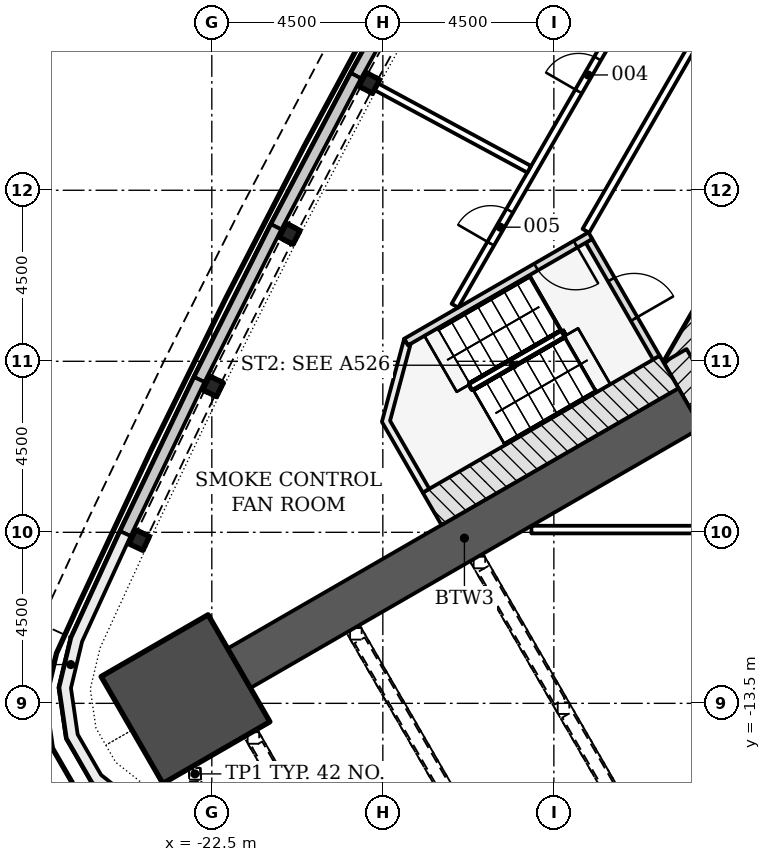
"""IFC4 building model, lengths in metres.
Left out: names, types, materials, properties, quantities, classifications, styles, units other than length and angle.
Written with IfcOpenShell. Run it as: python <this file> out.ifc"""

import sys

from ifc_helpers import new_model, si_unit, direction, frame, frame_2d, origin, origin_2d, place, context, subcontext, project, spatial, polyline, rectangle, i_section, outline, extrude, element, fill, save


model = new_model("IFC4")
c1 = context("Model", 3, precision=1e-05, world=origin(), true_north=direction((0.0, 1.0)))
c2 = subcontext(c1, "Body", "Model", "MODEL_VIEW")
j1 = project(units=[si_unit("LENGTHUNIT", "METRE"), si_unit("PLANEANGLEUNIT", "RADIAN")], contexts=[c1])
p1 = place(None, origin())
s1 = spatial("IfcSite", under=j1, at=p1, CompositionType="ELEMENT")
p2 = place(p1, origin())
s2 = spatial("IfcBuilding", under=s1, at=p2, CompositionType="ELEMENT")
p3 = place(p2, frame((0.0, 0.0, 52.8)))
s3 = spatial("IfcBuildingStorey", under=s2, at=p3, CompositionType="ELEMENT", Elevation=52.8)
p4 = place(p3, frame((-1.083, 11.281, -0.3), z_axis=(0.0, 0.0, 1.0), x_axis=(-0.500001446645, -0.866024568562, 0.0)))
e1 = element("IfcWall", 1, at=p4, inside=s3, PredefinedType="SHEAR", context=c2, shape_type="SweptSolid", body=[
    extrude(rectangle(XDim=18.458, YDim=0.7, at=frame_2d((9.229, 0.0))), origin(), (0.0, 0.0, 1.0), 5.5),
])
p5 = place(p4, frame((8.979, 0.0, 0.3)))
e2 = element("IfcOpeningElement", 2, at=p5, cuts=e1, PredefinedType="OPENING", context=c2, shape_type="SweptSolid", body=[
    extrude(rectangle(XDim=1.2, YDim=2.1, at=frame_2d((0.6, 1.05))), frame((0.0, 0.36, 0.0), z_axis=(0.0, -1.0, 0.0), x_axis=(1.0, 0.0, 0.0)), (0.0, 0.0, 1.0), 0.72),
])
p6 = place(p4, frame((11.029, 0.0, 0.3)))
e3 = element("IfcOpeningElement", 3, at=p6, cuts=e1, PredefinedType="OPENING", context=c2, shape_type="SweptSolid", body=[
    extrude(rectangle(XDim=1.2, YDim=2.1, at=frame_2d((0.6, 1.05))), frame((0.0, 0.36, 0.0), z_axis=(0.0, -1.0, 0.0), x_axis=(1.0, 0.0, 0.0)), (0.0, 0.0, 1.0), 0.72),
])
p7 = place(p3, frame((-10.311, -4.353, -0.3), z_axis=(0.0, 0.0, 1.0), x_axis=(0.500042739161, -0.866000726912, 0.0)))
e4 = element("IfcWall", 4, at=p7, inside=s3, PredefinedType="SHEAR", context=c2, shape_type="SweptSolid", body=[
    extrude(rectangle(XDim=2.771, YDim=0.7, at=frame_2d((1.386, 0.0))), origin(), (0.0, 0.0, 1.0), 5.5),
])
p8 = place(p3, frame((-9.922, -5.728, -0.3), z_axis=(0.0, 0.0, 1.0), x_axis=(-0.866030067197, -0.499991922645, 0.0)))
e5 = element("IfcWall", 5, at=p8, inside=s3, PredefinedType="SHEAR", context=c2, shape_type="SweptSolid", body=[
    extrude(rectangle(XDim=13.698, YDim=1.2, at=frame_2d((6.849, 0.0))), origin(), (0.0, 0.0, 1.0), 5.5),
])
p9 = place(p3, frame((-23.192, -13.39, -0.3), z_axis=(0.0, 0.0, 1.0), x_axis=(-0.866025403784, -0.5, 0.0)))
e6 = element("IfcColumn", 6, at=p9, inside=s3, PredefinedType="COLUMN", context=c2, shape_type="SweptSolid", body=[
    extrude(rectangle(XDim=3.25, YDim=3.25, at=origin_2d()), origin(), (0.0, 0.0, 1.0), 5.5),
])
for number, where, z_axis, x_axis in (
    (7, (-18.356, 2.823, -0.3), (0.0, 0.0, 1.0), (-0.475, -0.88, 0.0)),
    (8, (-20.451, -1.148, -0.3), (0.0, 0.0, 1.0), (-0.458, -0.889, 0.0)),
    (9, (-22.469, -5.158, -0.3), (0.0, 0.0, 1.0), (-0.441, -0.897, 0.0)),
    (10, (-24.411, -9.206, -0.3), (0.0, 0.0, 1.0), (-0.424, -0.906, 0.0)),
):
    element("IfcColumn", number, at=place(p3, frame(where, z_axis=z_axis, x_axis=x_axis)), inside=s3, PredefinedType="COLUMN", context=c2, shape_type="SweptSolid", body=[
        extrude(i_section(OverallWidth=0.404, OverallDepth=0.406, WebThickness=0.027, FlangeThickness=0.044, FilletRadius=0.015, at=origin_2d()), origin(), (0.0, 0.0, 1.0), 5.5),
    ])
p10 = place(p3, origin())
e11 = element("IfcWall", 11, at=p10, inside=s3, PredefinedType="NOTDEFINED", context=c2, shape_type="SweptSolid", body=[
    extrude(outline(polyline([(-16.665, 7.023), (-18.84, 3.084), (-18.578, 2.939), (-16.402, 6.878), (-16.665, 7.023)])), origin(), (0.0, 0.0, 1.0), 1.2),
])
p11 = place(p3, origin())
e12 = element("IfcWall", 12, at=p11, inside=s3, PredefinedType="NOTDEFINED", context=c2, shape_type="SweptSolid", body=[
    extrude(outline(polyline([(-18.84, 3.084), (-20.94, -0.896), (-20.674, -1.036), (-18.575, 2.944), (-18.84, 3.084)])), origin(), (0.0, 0.0, 1.0), 1.2),
])
p12 = place(p3, origin())
e13 = element("IfcWall", 13, at=p12, inside=s3, PredefinedType="NOTDEFINED", context=c2, shape_type="SweptSolid", body=[
    extrude(outline(polyline([(-20.94, -0.896), (-22.963, -4.916), (-22.695, -5.05), (-20.672, -1.031), (-20.94, -0.896)])), origin(), (0.0, 0.0, 1.0), 1.2),
])
p13 = place(p3, origin())
e14 = element("IfcWall", 14, at=p13, inside=s3, PredefinedType="NOTDEFINED", context=c2, shape_type="SweptSolid", body=[
    extrude(outline(polyline([(-22.963, -4.916), (-24.909, -8.973), (-24.638, -9.103), (-22.692, -5.045), (-22.963, -4.916)])), origin(), (0.0, 0.0, 1.0), 1.2),
])
p14 = place(p3, origin())
e15 = element("IfcWall", 15, at=p14, inside=s3, PredefinedType="NOTDEFINED", context=c2, shape_type="SweptSolid", body=[
    extrude(outline(polyline([(-24.909, -8.973), (-26.198, -11.776), (-26.511, -13.085), (-26.318, -14.417), (-25.645, -15.583), (-24.588, -16.417), (-23.297, -16.8), (-23.212, -16.513), (-24.447, -16.146), (-25.414, -15.384), (-26.029, -14.317), (-26.206, -13.099), (-25.913, -11.875), (-24.636, -9.098), (-24.909, -8.973)])), origin(), (0.0, 0.0, 1.0), 5.2),
])
p15 = place(p3, frame((-12.576, -1.331, -0.3), z_axis=(0.0, 0.0, 1.0), x_axis=(0.499970499736, -0.8660424351, 0.0)))
e16 = element("IfcWall", 16, at=p15, inside=s3, PredefinedType="SHEAR", context=c2, shape_type="SweptSolid", body=[
    extrude(rectangle(XDim=3.55, YDim=0.2, at=frame_2d((1.775, 0.0))), origin(), (0.0, 0.0, 1.0), 5.5),
])
p16 = place(p15, frame((1.175, 0.0, 0.3)))
e17 = element("IfcOpeningElement", 17, at=p16, cuts=e16, PredefinedType="OPENING", context=c2, shape_type="SweptSolid", body=[
    extrude(rectangle(XDim=1.2, YDim=2.1, at=frame_2d((0.6, 1.05))), frame((0.0, 0.11, 0.0), z_axis=(0.0, -1.0, 0.0), x_axis=(1.0, 0.0, 0.0)), (0.0, 0.0, 1.0), 0.22),
])
p17 = place(p3, frame((-12.539, -1.194, -0.3), z_axis=(0.0, 0.0, 1.0), x_axis=(-0.866045472092, -0.499965239061, 0.0)))
e18 = element("IfcWall", 18, at=p17, inside=s3, PredefinedType="SHEAR", context=c2, shape_type="SweptSolid", body=[
    extrude(rectangle(XDim=5.6, YDim=0.2, at=frame_2d((2.8, 0.0))), origin(), (0.0, 0.0, 1.0), 5.5),
])
p18 = place(p17, frame((0.45, 0.0, 0.3)))
e19 = element("IfcOpeningElement", 19, at=p18, cuts=e18, PredefinedType="OPENING", context=c2, shape_type="SweptSolid", body=[
    extrude(rectangle(XDim=1.2, YDim=2.1, at=frame_2d((0.6, 1.05))), frame((0.0, 0.11, 0.0), z_axis=(0.0, -1.0, 0.0), x_axis=(1.0, 0.0, 0.0)), (0.0, 0.0, 1.0), 0.22),
])
p19 = place(p3, frame((-10.468, -4.782, -0.3), z_axis=(0.0, 0.0, 1.0), x_axis=(-0.866018442252, -0.500012057535, 0.0)))
e20 = element("IfcWall", 20, at=p19, inside=s3, PredefinedType="SHEAR", context=c2, shape_type="SweptSolid", body=[
    extrude(rectangle(XDim=7.2, YDim=0.986, at=frame_2d((3.6, 0.0))), origin(), (0.0, 0.0, 1.0), 5.5),
])
p20 = place(p3, frame((0.0, 0.0, -0.3)))
e21 = element("IfcWall", 21, at=p20, inside=s3, PredefinedType="SHEAR", context=c2, shape_type="SweptSolid", body=[
    extrude(outline(polyline([(-17.439, -3.907), (-18.025, -6.093), (-16.95, -7.955), (-16.777, -7.855), (-17.81, -6.065), (-17.267, -4.039), (-17.339, -4.081), (-17.339, -4.081), (-17.339, -4.081), (-17.339, -4.081), (-17.339, -4.081), (-17.339, -4.081), (-17.339, -4.081), (-17.339, -4.081), (-17.339, -4.081), (-17.339, -4.081), (-17.339, -4.081), (-17.339, -4.081), (-17.339, -4.081), (-17.339, -4.081), (-17.339, -4.081), (-17.339, -4.081), (-17.339, -4.081), (-17.439, -3.907)])), origin(), (0.0, 0.0, 1.0), 5.5),
])
p21 = place(p3, frame((-0.687, 19.667, 0.0), z_axis=(0.0, 0.0, 1.0), x_axis=(-0.500000491645, -0.866025119933, 0.0)))
e22 = element("IfcWall", 22, at=p21, inside=s3, PredefinedType="PARTITIONING", context=c2, shape_type="SweptSolid", body=[
    extrude(rectangle(XDim=23.943, YDim=0.2, at=frame_2d((11.971, 0.0))), origin(), (0.0, 0.0, 1.0), 4.578),
])
p22 = place(p21, frame((16.287, 0.0, 0.0)))
e23 = element("IfcOpeningElement", 23, at=p22, cuts=e22, PredefinedType="OPENING", context=c2, shape_type="SweptSolid", body=[
    extrude(rectangle(XDim=1.2, YDim=2.1, at=frame_2d((0.6, 1.05))), frame((0.0, 0.11, 0.0), z_axis=(0.0, -1.0, 0.0), x_axis=(1.0, 0.0, 0.0)), (0.0, 0.0, 1.0), 0.22),
])
p23 = place(p3, frame((-16.104, -3.037, 0.0), z_axis=(0.0, 0.0, 1.0), x_axis=(0.500000029135, 0.866025386963, 0.0)))
e24 = element("IfcWall", 24, at=p23, inside=s3, PredefinedType="PARTITIONING", context=c2, shape_type="SweptSolid", body=[
    extrude(rectangle(XDim=30.835, YDim=0.2, at=frame_2d((15.417, 0.0))), origin(), (0.0, 0.0, 1.0), 4.578),
])
p24 = place(p23, frame((23.641, 0.0, 0.0)))
e25 = element("IfcOpeningElement", 25, at=p24, cuts=e24, PredefinedType="OPENING", context=c2, shape_type="SweptSolid", body=[
    extrude(rectangle(XDim=1.0, YDim=2.1, at=frame_2d((0.5, 1.05))), frame((0.0, 0.11, 0.0), z_axis=(0.0, -1.0, 0.0), x_axis=(1.0, 0.0, 0.0)), (0.0, 0.0, 1.0), 0.22),
])
p25 = place(p23, frame((14.681, 0.0, 0.0)))
e26 = element("IfcOpeningElement", 26, at=p25, cuts=e24, PredefinedType="OPENING", context=c2, shape_type="SweptSolid", body=[
    extrude(rectangle(XDim=1.0, YDim=2.1, at=frame_2d((0.5, 1.05))), frame((0.0, 0.11, 0.0), z_axis=(0.0, -1.0, 0.0), x_axis=(1.0, 0.0, 0.0)), (0.0, 0.0, 1.0), 0.22),
])
p26 = place(p23, frame((10.698, 0.0, 0.0)))
e27 = element("IfcOpeningElement", 27, at=p26, cuts=e24, PredefinedType="OPENING", context=c2, shape_type="SweptSolid", body=[
    extrude(rectangle(XDim=1.0, YDim=2.1, at=frame_2d((0.5, 1.05))), frame((0.0, 0.11, 0.0), z_axis=(0.0, -1.0, 0.0), x_axis=(1.0, 0.0, 0.0)), (0.0, 0.0, 1.0), 0.22),
])
p27 = place(p23, frame((6.51, 0.0, 0.0)))
e28 = element("IfcOpeningElement", 28, at=p27, cuts=e24, PredefinedType="OPENING", context=c2, shape_type="SweptSolid", body=[
    extrude(rectangle(XDim=1.0, YDim=2.1, at=frame_2d((0.5, 1.05))), frame((0.0, 0.11, 0.0), z_axis=(0.0, -1.0, 0.0), x_axis=(1.0, 0.0, 0.0)), (0.0, 0.0, 1.0), 0.22),
])
p28 = place(p23, frame((1.885, 0.0, 0.0)))
e29 = element("IfcOpeningElement", 29, at=p28, cuts=e24, PredefinedType="OPENING", context=c2, shape_type="SweptSolid", body=[
    extrude(rectangle(XDim=1.0, YDim=2.1, at=frame_2d((0.5, 1.05))), frame((0.0, 0.11, 0.0), z_axis=(0.0, -1.0, 0.0), x_axis=(1.0, 0.0, 0.0)), (0.0, 0.0, 1.0), 0.22),
])
p29 = place(p3, frame((-18.224, 2.752, 0.0), z_axis=(0.0, 0.0, 1.0), x_axis=(0.879981234657, -0.475008449032, 0.0)))
e30 = element("IfcWall", 30, at=p29, inside=s3, PredefinedType="PARTITIONING", context=c2, shape_type="SweptSolid", body=[
    extrude(rectangle(XDim=4.629, YDim=0.2, at=frame_2d((2.315, 0.0))), origin(), (0.0, 0.0, 1.0), 4.578),
])
p30 = place(p3, frame((-14.091, -8.928, 0.0), z_axis=(0.0, 0.0, 1.0), x_axis=(1.0, 0.0, 0.0)))
e31 = element("IfcWall", 31, at=p30, inside=s3, PredefinedType="PARTITIONING", context=c2, shape_type="SweptSolid", body=[
    extrude(rectangle(XDim=18.991, YDim=0.2, at=frame_2d((9.495, 0.0))), origin(), (0.0, 0.0, 1.0), 4.578),
])
p31 = place(p30, frame((7.642, 0.0, 0.0)))
e32 = element("IfcOpeningElement", 32, at=p31, cuts=e31, PredefinedType="OPENING", context=c2, shape_type="SweptSolid", body=[
    extrude(rectangle(XDim=1.0, YDim=2.1, at=frame_2d((0.5, 1.05))), frame((0.0, 0.11, 0.0), z_axis=(0.0, -1.0, 0.0), x_axis=(1.0, 0.0, 0.0)), (0.0, 0.0, 1.0), 0.22),
])
p32 = place(p30, frame((17.011, 0.0, 0.0)))
e33 = element("IfcOpeningElement", 33, at=p32, cuts=e31, PredefinedType="OPENING", context=c2, shape_type="SweptSolid", body=[
    extrude(rectangle(XDim=1.0, YDim=2.1, at=frame_2d((0.5, 1.05))), frame((0.0, 0.11, 0.0), z_axis=(0.0, -1.0, 0.0), x_axis=(1.0, 0.0, 0.0)), (0.0, 0.0, 1.0), 0.22),
])
p33 = place(p16, origin())
e34 = element("IfcDoor", 34, at=p33, inside=s3, OperationType="SINGLE_SWING_RIGHT", PredefinedType="DOOR", context=c2, shape_type="SweptSolid", body=[
    extrude(rectangle(XDim=1.2, YDim=2.1, at=frame_2d((0.6, 1.05))), frame((0.0, 0.025, 0.0), z_axis=(0.0, -1.0, 0.0), x_axis=(1.0, 0.0, 0.0)), (0.0, 0.0, 1.0), 0.05),
])
fill(e17, e34)
p34 = place(p18, origin())
e35 = element("IfcDoor", 35, at=p34, inside=s3, OperationType="SINGLE_SWING_LEFT", PredefinedType="DOOR", context=c2, shape_type="SweptSolid", body=[
    extrude(rectangle(XDim=1.2, YDim=2.1, at=frame_2d((0.6, 1.05))), frame((0.0, 0.025, 0.0), z_axis=(0.0, -1.0, 0.0), x_axis=(1.0, 0.0, 0.0)), (0.0, 0.0, 1.0), 0.05),
])
fill(e19, e35)
p35 = place(p27, origin())
e36 = element("IfcDoor", 36, at=p35, inside=s3, OperationType="SINGLE_SWING_LEFT", PredefinedType="DOOR", context=c2, shape_type="SweptSolid", body=[
    extrude(rectangle(XDim=1.0, YDim=2.1, at=frame_2d((0.5, 1.05))), frame((0.0, 0.025, 0.0), z_axis=(0.0, -1.0, 0.0), x_axis=(1.0, 0.0, 0.0)), (0.0, 0.0, 1.0), 0.05),
])
fill(e28, e36)
p36 = place(p28, origin())
e37 = element("IfcDoor", 37, at=p36, inside=s3, OperationType="SINGLE_SWING_LEFT", PredefinedType="DOOR", context=c2, shape_type="SweptSolid", body=[
    extrude(rectangle(XDim=1.0, YDim=2.1, at=frame_2d((0.5, 1.05))), frame((0.0, 0.025, 0.0), z_axis=(0.0, -1.0, 0.0), x_axis=(1.0, 0.0, 0.0)), (0.0, 0.0, 1.0), 0.05),
])
fill(e29, e37)
save(model, sys.argv[1])
